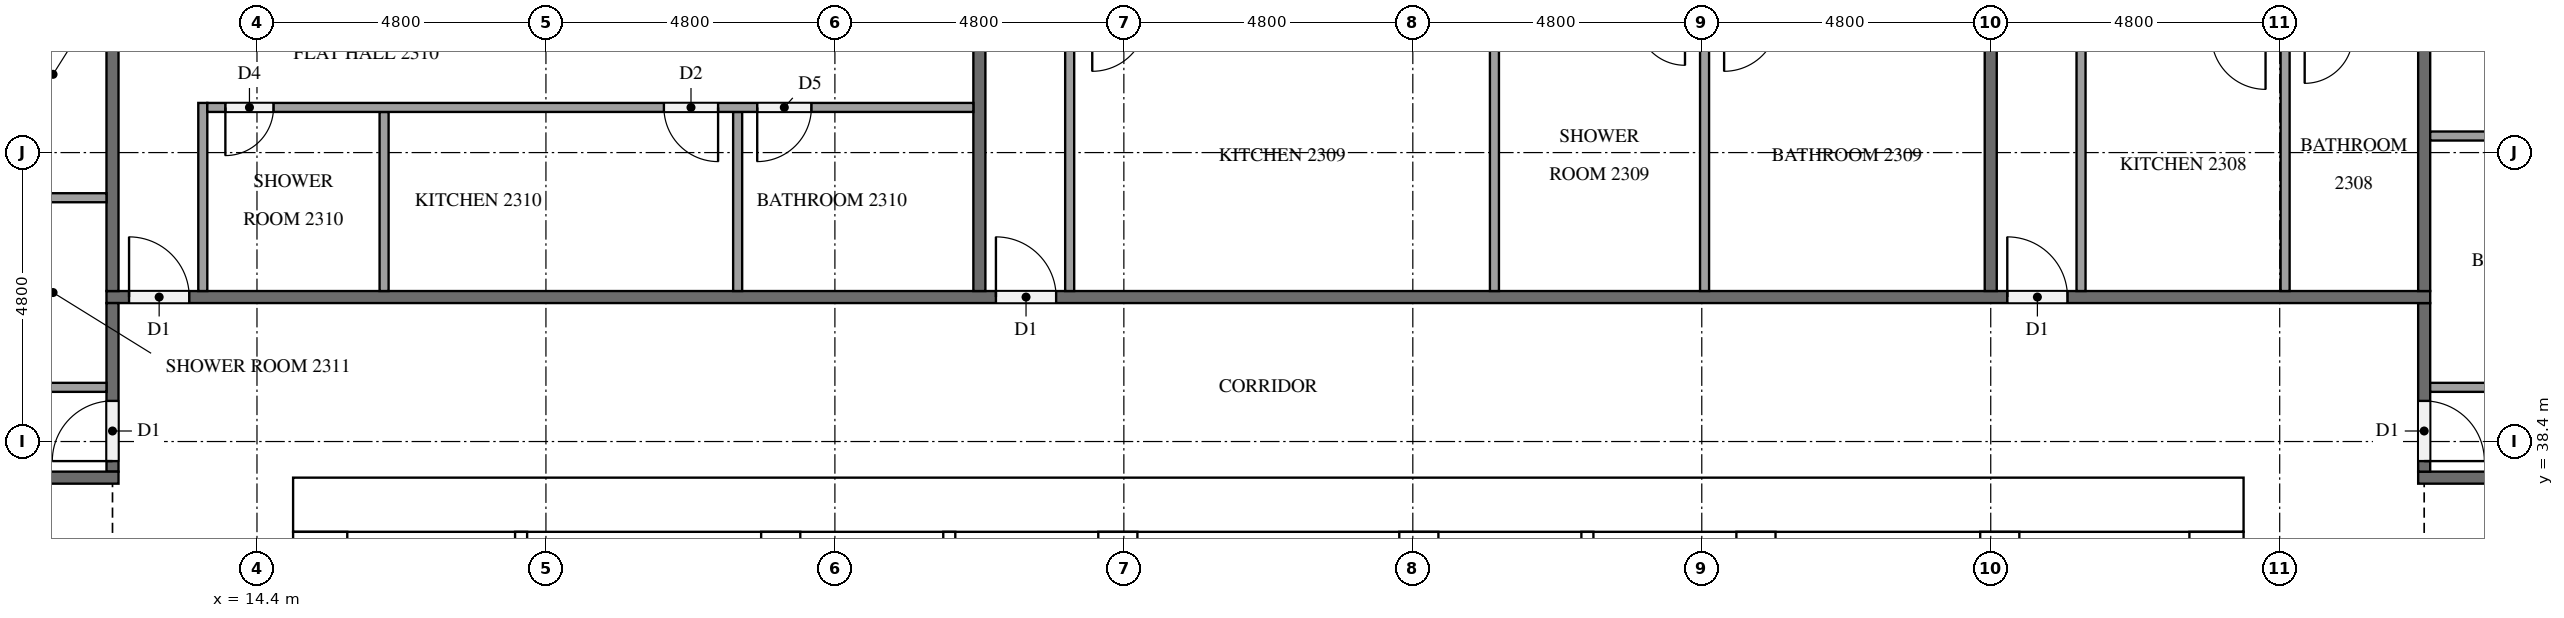
"""IFC4 building model, lengths in metres.
Left out: names, types, materials, properties, quantities, classifications, styles, units other than length and angle.
Written with IfcOpenShell. Run it as: python <this file> out.ifc"""

import sys

from ifc_helpers import new_model, si_unit, direction, frame, frame_2d, origin, place, context, subcontext, project, spatial, rectangle, extrude, element, fill, save


model = new_model("IFC4")
c1 = context("Model", 3, precision=1e-05, world=origin(), true_north=direction((0.0, 1.0)))
c2 = subcontext(c1, "Body", "Model", "MODEL_VIEW")
j1 = project(units=[si_unit("LENGTHUNIT", "METRE"), si_unit("PLANEANGLEUNIT", "RADIAN")], contexts=[c1])
p1 = place(None, origin())
s1 = spatial("IfcSite", under=j1, at=p1, CompositionType="ELEMENT")
p2 = place(p1, origin())
s2 = spatial("IfcBuilding", under=s1, at=p2, CompositionType="ELEMENT")
p3 = place(p2, frame((0.0, 0.0, 92.7)))
s3 = spatial("IfcBuildingStorey", under=s2, at=p3, CompositionType="ELEMENT", Elevation=92.7)
p4 = place(p3, frame((15.0, 37.35, 0.0), z_axis=(0.0, 0.0, 1.0), x_axis=(1.0, 0.0, 0.0)))
e1 = element("IfcWall", 1, at=p4, inside=s3, PredefinedType="SHEAR", context=c2, shape_type="SweptSolid", body=[
    extrude(rectangle(XDim=32.4, YDim=0.9, at=frame_2d((16.2, 0.0))), origin(), (0.0, 0.0, 1.0), 3.2),
])
p5 = place(p4, frame((15.3, 0.0, 0.0)))
e2 = element("IfcOpeningElement", 2, at=p5, cuts=e1, PredefinedType="OPENING", context=c2, shape_type="SweptSolid", body=[
    extrude(rectangle(XDim=1.8, YDim=2.1, at=frame_2d((0.9, 1.05))), frame((0.0, 0.46, 0.0), z_axis=(0.0, -1.0, 0.0), x_axis=(1.0, 0.0, 0.0)), (0.0, 0.0, 1.0), 0.92),
])
p6 = place(p4, frame((1.794, 0.0, 0.0)))
e3 = element("IfcOpeningElement", 3, at=p6, cuts=e1, PredefinedType="OPENING", context=c2, shape_type="SweptSolid", body=[
    extrude(rectangle(XDim=1.0, YDim=2.1, at=frame_2d((0.5, 1.05))), frame((0.0, 0.46, 0.0), z_axis=(0.0, -1.0, 0.0), x_axis=(1.0, 0.0, 0.0)), (0.0, 0.0, 1.0), 0.92),
])
p7 = place(p4, frame((5.331, 0.0, 0.0)))
e4 = element("IfcOpeningElement", 4, at=p7, cuts=e1, PredefinedType="OPENING", context=c2, shape_type="SweptSolid", body=[
    extrude(rectangle(XDim=1.0, YDim=2.1, at=frame_2d((0.5, 1.05))), frame((0.0, 0.46, 0.0), z_axis=(0.0, -1.0, 0.0), x_axis=(1.0, 0.0, 0.0)), (0.0, 0.0, 1.0), 0.92),
])
p8 = place(p3, frame((15.45, 15.9, 0.0), z_axis=(0.0, 0.0, 1.0), x_axis=(0.0, 1.0, 0.0)))
e5 = element("IfcWall", 5, at=p8, inside=s3, PredefinedType="SHEAR", context=c2, shape_type="SweptSolid", body=[
    extrude(rectangle(XDim=21.0, YDim=0.9, at=frame_2d((10.5, 0.0))), origin(), (0.0, 0.0, 1.0), 3.2),
])
p9 = place(p8, frame((4.86, 0.0, 0.0)))
e6 = element("IfcOpeningElement", 6, at=p9, cuts=e5, PredefinedType="OPENING", context=c2, shape_type="SweptSolid", body=[
    extrude(rectangle(XDim=1.2, YDim=2.1, at=frame_2d((0.6, 1.05))), frame((0.0, 0.46, 0.0), z_axis=(0.0, -1.0, 0.0), x_axis=(1.0, 0.0, 0.0)), (0.0, 0.0, 1.0), 0.92),
])
p10 = place(p3, frame((46.95, 15.9, 0.0), z_axis=(0.0, 0.0, 1.0), x_axis=(0.0, 1.0, 0.0)))
e7 = element("IfcWall", 7, at=p10, inside=s3, PredefinedType="SHEAR", context=c2, shape_type="SweptSolid", body=[
    extrude(rectangle(XDim=21.0, YDim=0.9, at=frame_2d((10.5, 0.0))), origin(), (0.0, 0.0, 1.0), 3.2),
])
p11 = place(p10, frame((10.2, 0.0, 0.0)))
e8 = element("IfcOpeningElement", 8, at=p11, cuts=e7, PredefinedType="OPENING", context=c2, shape_type="SweptSolid", body=[
    extrude(rectangle(XDim=1.2, YDim=2.1, at=frame_2d((0.6, 1.05))), frame((0.0, 0.46, 0.0), z_axis=(0.0, -1.0, 0.0), x_axis=(1.0, 0.0, 0.0)), (0.0, 0.0, 1.0), 0.92),
])
p12 = place(p3, frame((23.1, 15.9, 0.0), z_axis=(0.0, 0.0, 1.0), x_axis=(0.0, 1.0, 0.0)))
e9 = element("IfcWall", 9, at=p12, inside=s3, PredefinedType="SHEAR", context=c2, shape_type="SweptSolid", body=[
    extrude(rectangle(XDim=21.0, YDim=0.65, at=frame_2d((10.5, 0.0))), origin(), (0.0, 0.0, 1.0), 3.2),
])
p13 = place(p3, frame((39.3, 27.75, 0.0), z_axis=(0.0, 0.0, 1.0), x_axis=(0.0, 1.0, 0.0)))
e10 = element("IfcWall", 10, at=p13, inside=s3, PredefinedType="SHEAR", context=c2, shape_type="SweptSolid", body=[
    extrude(rectangle(XDim=9.15, YDim=0.65, at=frame_2d((4.575, 0.0))), origin(), (0.0, 0.0, 1.0), 3.2),
])
p14 = place(p3, frame((43.35, 27.75, 0.0), z_axis=(0.0, 0.0, 1.0), x_axis=(0.0, 1.0, 0.0)))
e11 = element("IfcWall", 11, at=p14, inside=s3, PredefinedType="SHEAR", context=c2, shape_type="SweptSolid", body=[
    extrude(rectangle(XDim=9.15, YDim=0.65, at=frame_2d((4.575, 0.0))), origin(), (0.0, 0.0, 1.0), 3.2),
])
p15 = place(p14, frame((7.65, 0.0, 0.0)))
e12 = element("IfcOpeningElement", 12, at=p15, cuts=e11, PredefinedType="OPENING", context=c2, shape_type="SweptSolid", body=[
    extrude(rectangle(XDim=1.2, YDim=2.1, at=frame_2d((0.6, 1.05))), frame((0.0, 0.335, 0.0), z_axis=(0.0, -1.0, 0.0), x_axis=(1.0, 0.0, 0.0)), (0.0, 0.0, 1.0), 0.67),
])
for number, where, z_axis, x_axis in (
    (13, (28.7, 33.875, 0.0), (0.0, 0.0, 1.0), (0.0, 1.0, 0.0)),
    (14, (33.7, 33.875, 0.0), (0.0, 0.0, 1.0), (0.0, 1.0, 0.0)),
):
    element("IfcWall", number, at=place(p3, frame(where, z_axis=z_axis, x_axis=x_axis)), inside=s3, PredefinedType="SHEAR", context=c2, shape_type="SweptSolid", body=[
        extrude(rectangle(XDim=3.025, YDim=0.65, at=frame_2d((1.512, 0.0))), origin(), (0.0, 0.0, 1.0), 3.2),
    ])
for number, where, z_axis, x_axis in (
    (15, (25.9, 33.875, 0.0), (0.0, 0.0, 1.0), (0.0, 1.0, 0.0)),
    (16, (36.5, 33.875, 0.0), (0.0, 0.0, 1.0), (0.0, 1.0, 0.0)),
):
    element("IfcWall", number, at=place(p3, frame(where, z_axis=z_axis, x_axis=x_axis)), inside=s3, PredefinedType="SOLIDWALL", context=c2, shape_type="SweptSolid", body=[
        extrude(rectangle(XDim=3.025, YDim=0.2, at=frame_2d((1.512, 0.0))), origin(), (0.0, 0.0, 1.0), 3.2),
    ])
p16 = place(p3, frame((18.788, 31.575, 0.0), z_axis=(0.0, 0.0, 1.0), x_axis=(0.0, 1.0, 0.0)))
e17 = element("IfcWall", 17, at=p16, inside=s3, PredefinedType="PARTITIONING", context=c2, shape_type="SweptSolid", body=[
    extrude(rectangle(XDim=5.325, YDim=0.2, at=frame_2d((2.663, 0.0))), origin(), (0.0, 0.0, 1.0), 3.2),
])
p17 = place(p3, frame((52.5, 37.8, 0.0), z_axis=(0.0, 0.0, 1.0), x_axis=(-1.0, 0.0, 0.0)))
e18 = element("IfcWall", 18, at=p17, inside=s3, PredefinedType="PARTITIONING", context=c2, shape_type="SweptSolid", body=[
    extrude(rectangle(XDim=2.2, YDim=0.2, at=frame_2d((1.1, 0.0))), origin(), (0.0, 0.0, 1.0), 3.2),
])
p18 = place(p3, frame((50.4, 40.7, 0.0), z_axis=(0.0, 0.0, 1.0), x_axis=(0.0, -1.0, 0.0)))
e19 = element("IfcWall", 19, at=p18, inside=s3, PredefinedType="PARTITIONING", context=c2, shape_type="SweptSolid", body=[
    extrude(rectangle(XDim=2.8, YDim=0.2, at=frame_2d((1.4, 0.0))), origin(), (0.0, 0.0, 1.0), 3.2),
])
p19 = place(p18, frame((1.625, 0.0, 0.0)))
e20 = element("IfcOpeningElement", 20, at=p19, cuts=e19, PredefinedType="OPENING", context=c2, shape_type="SweptSolid", body=[
    extrude(rectangle(XDim=1.0, YDim=2.1, at=frame_2d((0.5, 1.05))), frame((0.0, 0.11, 0.0), z_axis=(0.0, -1.0, 0.0), x_axis=(1.0, 0.0, 0.0)), (0.0, 0.0, 1.0), 0.22),
])
p20 = place(p3, frame((11.9, 40.8, 0.0), z_axis=(0.0, 0.0, 1.0), x_axis=(1.0, 0.0, 0.0)))
e21 = element("IfcWall", 21, at=p20, inside=s3, PredefinedType="PARTITIONING", context=c2, shape_type="SweptSolid", body=[
    extrude(rectangle(XDim=38.6, YDim=0.2, at=frame_2d((19.3, 0.0))), origin(), (0.0, 0.0, 1.0), 3.2),
])
p21 = place(p20, frame((31.575, 0.0, 0.0)))
e22 = element("IfcOpeningElement", 22, at=p21, cuts=e21, PredefinedType="OPENING", context=c2, shape_type="SweptSolid", body=[
    extrude(rectangle(XDim=1.0, YDim=2.1, at=frame_2d((0.5, 1.05))), frame((0.0, 0.11, 0.0), z_axis=(0.0, -1.0, 0.0), x_axis=(1.0, 0.0, 0.0)), (0.0, 0.0, 1.0), 0.22),
])
p22 = place(p20, frame((14.775, 0.0, 0.0)))
e23 = element("IfcOpeningElement", 23, at=p22, cuts=e21, PredefinedType="OPENING", context=c2, shape_type="SweptSolid", body=[
    extrude(rectangle(XDim=1.0, YDim=2.1, at=frame_2d((0.5, 1.05))), frame((0.0, 0.11, 0.0), z_axis=(0.0, -1.0, 0.0), x_axis=(1.0, 0.0, 0.0)), (0.0, 0.0, 1.0), 0.22),
])
p23 = place(p20, frame((0.375, 0.0, 0.0)))
e24 = element("IfcOpeningElement", 24, at=p23, cuts=e21, PredefinedType="OPENING", context=c2, shape_type="SweptSolid", body=[
    extrude(rectangle(XDim=1.0, YDim=2.1, at=frame_2d((0.5, 1.05))), frame((0.0, 0.11, 0.0), z_axis=(0.0, -1.0, 0.0), x_axis=(1.0, 0.0, 0.0)), (0.0, 0.0, 1.0), 0.22),
])
p24 = place(p3, frame((12.0, 37.9, 0.0), z_axis=(0.0, 0.0, 1.0), x_axis=(0.0, 1.0, 0.0)))
e25 = element("IfcWall", 25, at=p24, inside=s3, PredefinedType="PARTITIONING", context=c2, shape_type="SweptSolid", body=[
    extrude(rectangle(XDim=2.8, YDim=0.2, at=frame_2d((1.4, 0.0))), origin(), (0.0, 0.0, 1.0), 3.2),
])
p25 = place(p24, frame((0.175, 0.0, 0.0)))
e26 = element("IfcOpeningElement", 26, at=p25, cuts=e25, PredefinedType="OPENING", context=c2, shape_type="SweptSolid", body=[
    extrude(rectangle(XDim=1.0, YDim=2.1, at=frame_2d((0.5, 1.05))), frame((0.0, 0.11, 0.0), z_axis=(0.0, -1.0, 0.0), x_axis=(1.0, 0.0, 0.0)), (0.0, 0.0, 1.0), 0.22),
])
p26 = place(p3, frame((12.1, 37.8, 0.0), z_axis=(0.0, 0.0, 1.0), x_axis=(-1.0, 0.0, 0.0)))
e27 = element("IfcWall", 27, at=p26, inside=s3, PredefinedType="PARTITIONING", context=c2, shape_type="SweptSolid", body=[
    extrude(rectangle(XDim=2.2, YDim=0.2, at=frame_2d((1.1, 0.0))), origin(), (0.0, 0.0, 1.0), 3.2),
])
for number, where, z_axis, x_axis in (
    (28, (50.4, 40.9, 0.0), (0.0, 0.0, 1.0), (0.0, 1.0, 0.0)),
    (29, (43.2, 52.7, 0.0), (0.0, 0.0, 1.0), (0.0, -1.0, 0.0)),
    (30, (26.4, 52.7, 0.0), (0.0, 0.0, 1.0), (0.0, -1.0, 0.0)),
    (31, (12.0, 52.7, 0.0), (0.0, 0.0, 1.0), (0.0, -1.0, 0.0)),
):
    element("IfcWall", number, at=place(p3, frame(where, z_axis=z_axis, x_axis=x_axis)), inside=s3, PredefinedType="PARTITIONING", context=c2, shape_type="SweptSolid", body=[
        extrude(rectangle(XDim=11.8, YDim=0.2, at=frame_2d((5.9, 0.0))), origin(), (0.0, 0.0, 1.0), 3.2),
    ])
p27 = place(p3, frame((50.5, 43.475, 0.0), z_axis=(0.0, 0.0, 1.0), x_axis=(1.0, 0.0, 0.0)))
e32 = element("IfcWall", 32, at=p27, inside=s3, PredefinedType="PARTITIONING", context=c2, shape_type="SweptSolid", body=[
    extrude(rectangle(XDim=3.875, YDim=0.15, at=frame_2d((1.938, 0.0))), origin(), (0.0, 0.0, 1.0), 3.2),
])
p28 = place(p3, frame((50.5, 39.3, 0.0), z_axis=(0.0, 0.0, 1.0), x_axis=(1.0, 0.0, 0.0)))
e33 = element("IfcWall", 33, at=p28, inside=s3, PredefinedType="PARTITIONING", context=c2, shape_type="SweptSolid", body=[
    extrude(rectangle(XDim=4.025, YDim=0.15, at=frame_2d((2.012, 0.0))), origin(), (0.0, 0.0, 1.0), 3.2),
])
p29 = place(p3, frame((48.09, 40.9, 0.0), z_axis=(0.0, 0.0, 1.0), x_axis=(0.0, 1.0, 0.0)))
e34 = element("IfcWall", 34, at=p29, inside=s3, PredefinedType="PARTITIONING", context=c2, shape_type="SweptSolid", body=[
    extrude(rectangle(XDim=4.175, YDim=0.15, at=frame_2d((2.087, 0.0))), origin(), (0.0, 0.0, 1.0), 3.2),
])
p30 = place(p3, frame((44.7, 40.9, 0.0), z_axis=(0.0, 0.0, 1.0), x_axis=(0.0, 1.0, 0.0)))
e35 = element("IfcWall", 35, at=p30, inside=s3, PredefinedType="PARTITIONING", context=c2, shape_type="SweptSolid", body=[
    extrude(rectangle(XDim=4.325, YDim=0.15, at=frame_2d((2.163, 0.0))), origin(), (0.0, 0.0, 1.0), 3.2),
])
for number, where, z_axis, x_axis in (
    (36, (34.956, 40.9, 0.0), (0.0, 0.0, 1.0), (0.0, 1.0, 0.0)),
    (37, (38.446, 40.9, 0.0), (0.0, 0.0, 1.0), (0.0, 1.0, 0.0)),
):
    element("IfcWall", number, at=place(p3, frame(where, z_axis=z_axis, x_axis=x_axis)), inside=s3, PredefinedType="PARTITIONING", context=c2, shape_type="SweptSolid", body=[
        extrude(rectangle(XDim=4.475, YDim=0.15, at=frame_2d((2.238, 0.0))), origin(), (0.0, 0.0, 1.0), 3.2),
    ])
p31 = place(p3, frame((27.9, 40.9, 0.0), z_axis=(0.0, 0.0, 1.0), x_axis=(0.0, 1.0, 0.0)))
e38 = element("IfcWall", 38, at=p31, inside=s3, PredefinedType="PARTITIONING", context=c2, shape_type="SweptSolid", body=[
    extrude(rectangle(XDim=4.625, YDim=0.15, at=frame_2d((2.312, 0.0))), origin(), (0.0, 0.0, 1.0), 3.2),
])
for number, where, z_axis, x_axis in (
    (39, (16.511, 40.9, 0.0), (0.0, 0.0, 1.0), (0.0, 1.0, 0.0)),
    (40, (22.385, 40.9, 0.0), (0.0, 0.0, 1.0), (0.0, 1.0, 0.0)),
):
    element("IfcWall", number, at=place(p3, frame(where, z_axis=z_axis, x_axis=x_axis)), inside=s3, PredefinedType="PARTITIONING", context=c2, shape_type="SweptSolid", body=[
        extrude(rectangle(XDim=2.975, YDim=0.15, at=frame_2d((1.488, 0.0))), origin(), (0.0, 0.0, 1.0), 3.2),
    ])
p32 = place(p3, frame((13.5, 40.9, 0.0), z_axis=(0.0, 0.0, 1.0), x_axis=(0.0, 1.0, 0.0)))
e41 = element("IfcWall", 41, at=p32, inside=s3, PredefinedType="PARTITIONING", context=c2, shape_type="SweptSolid", body=[
    extrude(rectangle(XDim=3.125, YDim=0.15, at=frame_2d((1.562, 0.0))), origin(), (0.0, 0.0, 1.0), 3.2),
])
p33 = place(p3, frame((26.3, 43.95, 0.0), z_axis=(0.0, 0.0, 1.0), x_axis=(-1.0, 0.0, 0.0)))
e42 = element("IfcWall", 42, at=p33, inside=s3, PredefinedType="PARTITIONING", context=c2, shape_type="SweptSolid", body=[
    extrude(rectangle(XDim=12.725, YDim=0.15, at=frame_2d((6.363, 0.0))), origin(), (0.0, 0.0, 1.0), 3.2),
])
p34 = place(p33, frame((11.625, 0.0, 0.0)))
e43 = element("IfcOpeningElement", 43, at=p34, cuts=e42, PredefinedType="OPENING", context=c2, shape_type="SweptSolid", body=[
    extrude(rectangle(XDim=0.8, YDim=2.1, at=frame_2d((0.4, 1.05))), frame((0.0, 0.085, 0.0), z_axis=(0.0, -1.0, 0.0), x_axis=(1.0, 0.0, 0.0)), (0.0, 0.0, 1.0), 0.17),
])
p35 = place(p33, frame((4.24, 0.0, 0.0)))
e44 = element("IfcOpeningElement", 44, at=p35, cuts=e42, PredefinedType="OPENING", context=c2, shape_type="SweptSolid", body=[
    extrude(rectangle(XDim=0.9, YDim=2.1, at=frame_2d((0.45, 1.05))), frame((0.0, 0.085, 0.0), z_axis=(0.0, -1.0, 0.0), x_axis=(1.0, 0.0, 0.0)), (0.0, 0.0, 1.0), 0.17),
])
p36 = place(p33, frame((2.69, 0.0, 0.0)))
e45 = element("IfcOpeningElement", 45, at=p36, cuts=e42, PredefinedType="OPENING", context=c2, shape_type="SweptSolid", body=[
    extrude(rectangle(XDim=0.9, YDim=2.1, at=frame_2d((0.45, 1.05))), frame((0.0, 0.085, 0.0), z_axis=(0.0, -1.0, 0.0), x_axis=(1.0, 0.0, 0.0)), (0.0, 0.0, 1.0), 0.17),
])
p37 = place(p3, frame((11.9, 42.45, 0.0), z_axis=(0.0, 0.0, 1.0), x_axis=(-1.0, 0.0, 0.0)))
e46 = element("IfcWall", 46, at=p37, inside=s3, PredefinedType="PARTITIONING", context=c2, shape_type="SweptSolid", body=[
    extrude(rectangle(XDim=1.775, YDim=0.15, at=frame_2d((0.887, 0.0))), origin(), (0.0, 0.0, 1.0), 3.2),
])
p38 = place(p3, frame((11.9, 39.3, 0.0), z_axis=(0.0, 0.0, 1.0), x_axis=(-1.0, 0.0, 0.0)))
e47 = element("IfcWall", 47, at=p38, inside=s3, PredefinedType="PARTITIONING", context=c2, shape_type="SweptSolid", body=[
    extrude(rectangle(XDim=1.925, YDim=0.15, at=frame_2d((0.962, 0.0))), origin(), (0.0, 0.0, 1.0), 3.2),
])
p39 = place(p5, origin())
e48 = element("IfcDoor", 48, at=p39, inside=s3, OperationType="DOUBLE_DOOR_SINGLE_SWING", PredefinedType="DOOR", context=c2, shape_type="SweptSolid", body=[
    extrude(rectangle(XDim=1.8, YDim=2.1, at=frame_2d((0.9, 1.05))), frame((0.0, 0.025, 0.0), z_axis=(0.0, -1.0, 0.0), x_axis=(1.0, 0.0, 0.0)), (0.0, 0.0, 1.0), 0.05),
])
fill(e2, e48)
p40 = place(p6, origin())
e49 = element("IfcDoor", 49, at=p40, inside=s3, OperationType="SINGLE_SWING_RIGHT", PredefinedType="DOOR", context=c2, shape_type="SweptSolid", body=[
    extrude(rectangle(XDim=1.0, YDim=2.1, at=frame_2d((0.5, 1.05))), frame((0.0, 0.025, 0.0), z_axis=(0.0, -1.0, 0.0), x_axis=(1.0, 0.0, 0.0)), (0.0, 0.0, 1.0), 0.05),
])
fill(e3, e49)
p41 = place(p7, origin())
e50 = element("IfcDoor", 50, at=p41, inside=s3, OperationType="SINGLE_SWING_LEFT", PredefinedType="DOOR", context=c2, shape_type="SweptSolid", body=[
    extrude(rectangle(XDim=1.0, YDim=2.1, at=frame_2d((0.5, 1.05))), frame((0.0, 0.025, 0.0), z_axis=(0.0, -1.0, 0.0), x_axis=(1.0, 0.0, 0.0)), (0.0, 0.0, 1.0), 0.05),
])
fill(e4, e50)
p42 = place(p19, origin())
e51 = element("IfcDoor", 51, at=p42, inside=s3, OperationType="SINGLE_SWING_RIGHT", PredefinedType="DOOR", context=c2, shape_type="SweptSolid", body=[
    extrude(rectangle(XDim=1.0, YDim=2.1, at=frame_2d((0.5, 1.05))), frame((0.0, 0.025, 0.0), z_axis=(0.0, -1.0, 0.0), x_axis=(1.0, 0.0, 0.0)), (0.0, 0.0, 1.0), 0.05),
])
fill(e20, e51)
p43 = place(p21, origin())
e52 = element("IfcDoor", 52, at=p43, inside=s3, OperationType="SINGLE_SWING_LEFT", PredefinedType="DOOR", context=c2, shape_type="SweptSolid", body=[
    extrude(rectangle(XDim=1.0, YDim=2.1, at=frame_2d((0.5, 1.05))), frame((0.0, 0.025, 0.0), z_axis=(0.0, -1.0, 0.0), x_axis=(1.0, 0.0, 0.0)), (0.0, 0.0, 1.0), 0.05),
])
fill(e22, e52)
p44 = place(p22, origin())
e53 = element("IfcDoor", 53, at=p44, inside=s3, OperationType="SINGLE_SWING_LEFT", PredefinedType="DOOR", context=c2, shape_type="SweptSolid", body=[
    extrude(rectangle(XDim=1.0, YDim=2.1, at=frame_2d((0.5, 1.05))), frame((0.0, 0.025, 0.0), z_axis=(0.0, -1.0, 0.0), x_axis=(1.0, 0.0, 0.0)), (0.0, 0.0, 1.0), 0.05),
])
fill(e23, e53)
p45 = place(p23, origin())
e54 = element("IfcDoor", 54, at=p45, inside=s3, OperationType="SINGLE_SWING_LEFT", PredefinedType="DOOR", context=c2, shape_type="SweptSolid", body=[
    extrude(rectangle(XDim=1.0, YDim=2.1, at=frame_2d((0.5, 1.05))), frame((0.0, 0.025, 0.0), z_axis=(0.0, -1.0, 0.0), x_axis=(1.0, 0.0, 0.0)), (0.0, 0.0, 1.0), 0.05),
])
fill(e24, e54)
p46 = place(p25, origin())
e55 = element("IfcDoor", 55, at=p46, inside=s3, OperationType="SINGLE_SWING_LEFT", PredefinedType="DOOR", context=c2, shape_type="SweptSolid", body=[
    extrude(rectangle(XDim=1.0, YDim=2.1, at=frame_2d((0.5, 1.05))), frame((0.0, 0.025, 0.0), z_axis=(0.0, -1.0, 0.0), x_axis=(1.0, 0.0, 0.0)), (0.0, 0.0, 1.0), 0.05),
])
fill(e26, e55)
p47 = place(p34, origin())
e56 = element("IfcDoor", 56, at=p47, inside=s3, OperationType="SINGLE_SWING_RIGHT", PredefinedType="DOOR", context=c2, shape_type="SweptSolid", body=[
    extrude(rectangle(XDim=0.8, YDim=2.1, at=frame_2d((0.4, 1.05))), frame((0.0, 0.025, 0.0), z_axis=(0.0, -1.0, 0.0), x_axis=(1.0, 0.0, 0.0)), (0.0, 0.0, 1.0), 0.05),
])
fill(e43, e56)
p48 = place(p35, origin())
e57 = element("IfcDoor", 57, at=p48, inside=s3, OperationType="SINGLE_SWING_LEFT", PredefinedType="DOOR", context=c2, shape_type="SweptSolid", body=[
    extrude(rectangle(XDim=0.9, YDim=2.1, at=frame_2d((0.45, 1.05))), frame((0.0, 0.025, 0.0), z_axis=(0.0, -1.0, 0.0), x_axis=(1.0, 0.0, 0.0)), (0.0, 0.0, 1.0), 0.05),
])
fill(e44, e57)
p49 = place(p36, origin())
e58 = element("IfcDoor", 58, at=p49, inside=s3, OperationType="SINGLE_SWING_RIGHT", PredefinedType="DOOR", context=c2, shape_type="SweptSolid", body=[
    extrude(rectangle(XDim=0.9, YDim=2.1, at=frame_2d((0.45, 1.05))), frame((0.0, 0.025, 0.0), z_axis=(0.0, -1.0, 0.0), x_axis=(1.0, 0.0, 0.0)), (0.0, 0.0, 1.0), 0.05),
])
fill(e45, e58)
save(model, sys.argv[1])
